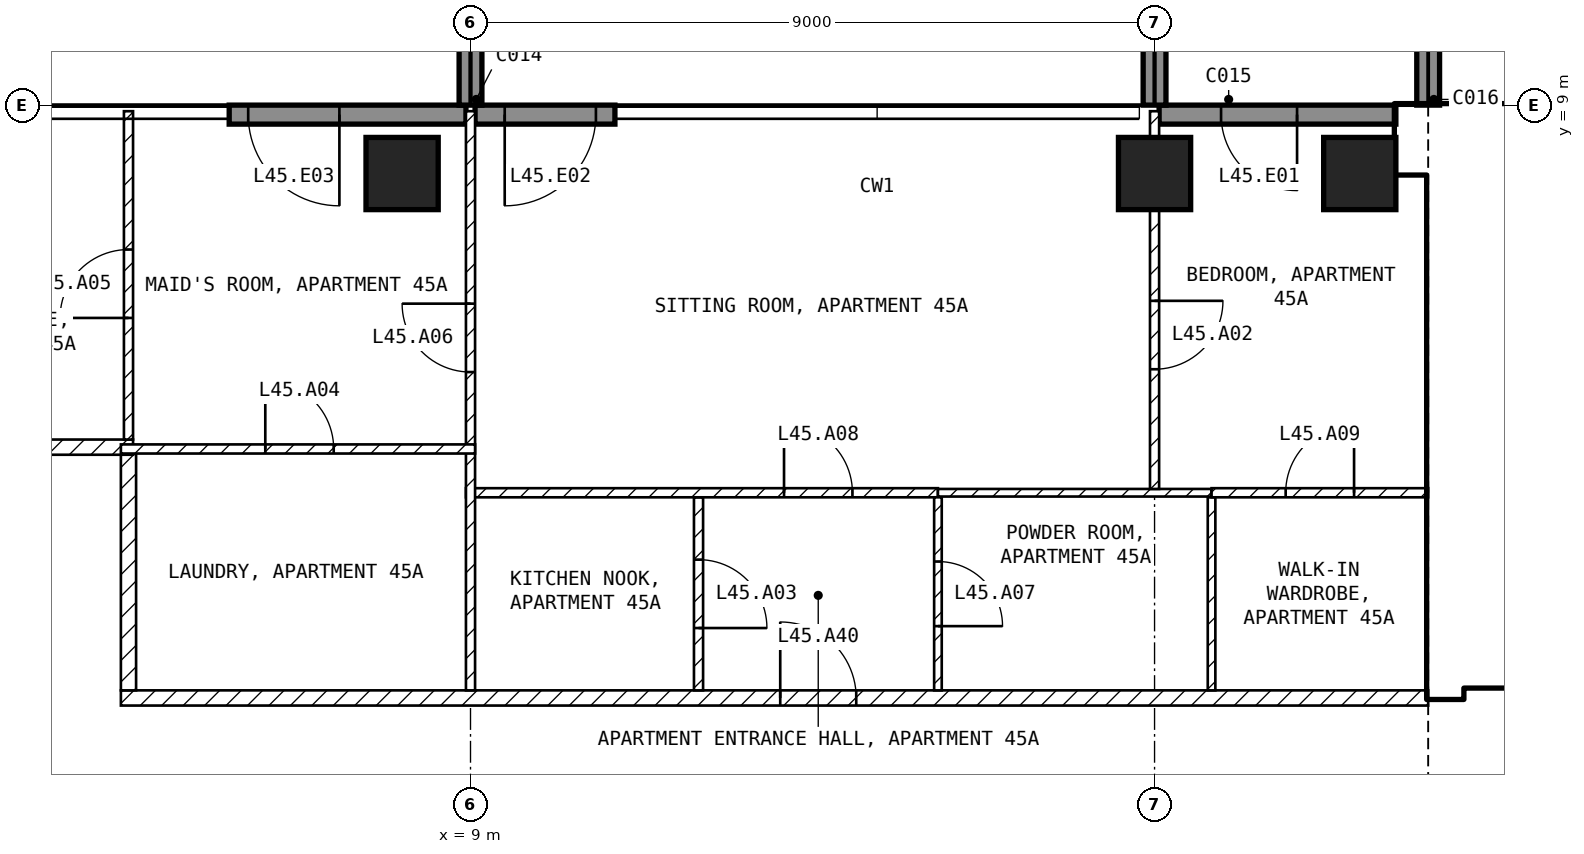
"""IFC4 building model, lengths in metres.
Left out: names, types, materials, properties, quantities, classifications, styles, units other than length and angle.
Written with IfcOpenShell. Run it as: python <this file> out.ifc"""

import sys

from ifc_helpers import new_model, si_unit, direction, frame, frame_2d, origin, origin_2d, place, context, subcontext, project, spatial, rectangle, extrude, element, fill, save


model = new_model("IFC4")
c1 = context("Model", 3, precision=1e-05, world=origin(), true_north=direction((0.0, 1.0)))
c2 = subcontext(c1, "Body", "Model", "MODEL_VIEW")
j1 = project(units=[si_unit("LENGTHUNIT", "METRE"), si_unit("PLANEANGLEUNIT", "RADIAN")], contexts=[c1])
p1 = place(None, origin())
s1 = spatial("IfcSite", under=j1, at=p1, CompositionType="ELEMENT")
p2 = place(p1, origin())
s2 = spatial("IfcBuilding", under=s1, at=p2, CompositionType="ELEMENT")
p3 = place(p2, frame((0.0, 0.0, 184.1)))
s3 = spatial("IfcBuildingStorey", under=s2, at=p3, CompositionType="ELEMENT", Elevation=184.1)
for number, where, z_axis, x_axis in (
    (1, (8.1, 8.1, -0.25), (0.0, 0.0, 1.0), (1.0, 0.0, 0.0)),
    (2, (18.0, 8.1, -0.25), (0.0, 0.0, 1.0), (1.0, 0.0, 0.0)),
    (3, (20.7, 8.1, -0.25), (0.0, 0.0, 1.0), (1.0, 0.0, 0.0)),
):
    element("IfcColumn", number, at=place(p3, frame(where, z_axis=z_axis, x_axis=x_axis)), inside=s3, PredefinedType="COLUMN", context=c2, shape_type="SweptSolid", body=[
        extrude(rectangle(XDim=0.95, YDim=0.95, at=origin_2d()), origin(), (0.0, 0.0, 1.0), 3.5),
    ])
p4 = place(p3, frame((21.175, 8.875, 0.0), z_axis=(0.0, 0.0, 1.0), x_axis=(-1.0, 0.0, 0.0)))
e4 = element("IfcWall", 4, at=p4, inside=s3, PredefinedType="SOLIDWALL", context=c2, shape_type="SweptSolid", body=[
    extrude(rectangle(XDim=3.115, YDim=0.25, at=frame_2d((1.558, 0.0))), origin(), (0.0, 0.0, 1.0), 3.25),
])
p5 = place(p4, frame((1.3, 0.0, 0.0)))
e5 = element("IfcOpeningElement", 5, at=p5, cuts=e4, PredefinedType="OPENING", context=c2, shape_type="SweptSolid", body=[
    extrude(rectangle(XDim=1.0, YDim=2.4, at=frame_2d((0.5, 1.2))), frame((0.0, 0.135, 0.0), z_axis=(0.0, -1.0, 0.0), x_axis=(1.0, 0.0, 0.0)), (0.0, 0.0, 1.0), 0.27),
])
p6 = place(p3, frame((10.9, 8.875, 0.0), z_axis=(0.0, 0.0, 1.0), x_axis=(-1.0, 0.0, 0.0)))
e6 = element("IfcWall", 6, at=p6, inside=s3, PredefinedType="SOLIDWALL", context=c2, shape_type="SweptSolid", body=[
    extrude(rectangle(XDim=1.84, YDim=0.25, at=frame_2d((0.92, 0.0))), origin(), (0.0, 0.0, 1.0), 3.25),
])
p7 = place(p6, frame((0.25, 0.0, 0.0)))
e7 = element("IfcOpeningElement", 7, at=p7, cuts=e6, PredefinedType="OPENING", context=c2, shape_type="SweptSolid", body=[
    extrude(rectangle(XDim=1.2, YDim=2.4, at=frame_2d((0.6, 1.2))), frame((0.0, 0.135, 0.0), z_axis=(0.0, -1.0, 0.0), x_axis=(1.0, 0.0, 0.0)), (0.0, 0.0, 1.0), 0.27),
])
p8 = place(p3, frame((8.94, 8.875, 0.0), z_axis=(0.0, 0.0, 1.0), x_axis=(-1.0, 0.0, 0.0)))
e8 = element("IfcWall", 8, at=p8, inside=s3, PredefinedType="SOLIDWALL", context=c2, shape_type="SweptSolid", body=[
    extrude(rectangle(XDim=3.115, YDim=0.25, at=frame_2d((1.558, 0.0))), origin(), (0.0, 0.0, 1.0), 3.25),
])
p9 = place(p8, frame((1.665, 0.0, 0.0)))
e9 = element("IfcOpeningElement", 9, at=p9, cuts=e8, PredefinedType="OPENING", context=c2, shape_type="SweptSolid", body=[
    extrude(rectangle(XDim=1.2, YDim=2.4, at=frame_2d((0.6, 1.2))), frame((0.0, 0.135, 0.0), z_axis=(0.0, -1.0, 0.0), x_axis=(1.0, 0.0, 0.0)), (0.0, 0.0, 1.0), 0.27),
])
for number, where, z_axis, x_axis in (
    (10, (9.0, 9.0, 0.0), (0.0, 0.0, 1.0), (0.0, 1.0, 0.0)),
    (11, (18.0, 9.0, 0.0), (0.0, 0.0, 1.0), (0.0, 1.0, 0.0)),
    (12, (21.6, 9.0, 0.0), (0.0, 0.0, 1.0), (0.0, 1.0, 0.0)),
):
    element("IfcWall", number, at=place(p3, frame(where, z_axis=z_axis, x_axis=x_axis)), inside=s3, PredefinedType="SOLIDWALL", context=c2, shape_type="SweptSolid", body=[
        extrude(rectangle(XDim=2.7, YDim=0.3, at=frame_2d((1.35, 0.0))), origin(), (0.0, 0.0, 1.0), 3.25),
    ])
p10 = place(p3, frame((21.175, 8.55, 0.0), z_axis=(0.0, 0.0, 1.0), x_axis=(1.0, 0.0, 0.0)))
e13 = element("IfcWall", 13, at=p10, inside=s3, PredefinedType="SHEAR", context=c2, shape_type="SweptSolid", body=[
    extrude(rectangle(XDim=8.425, YDim=0.9, at=frame_2d((4.212, 0.0))), origin(), (0.0, 0.0, 1.0), 3.25),
])
p11 = place(p3, frame((21.825, 1.2, 0.0), z_axis=(0.0, 0.0, 1.0), x_axis=(0.0, 1.0, 0.0)))
e14 = element("IfcWall", 14, at=p11, inside=s3, PredefinedType="SHEAR", context=c2, shape_type="SweptSolid", body=[
    extrude(rectangle(XDim=6.9, YDim=0.45, at=frame_2d((3.45, 0.0))), origin(), (0.0, 0.0, 1.0), 3.25),
])
p12 = place(p3, frame((22.05, 1.45, 0.0), z_axis=(0.0, 0.0, 1.0), x_axis=(1.0, 0.0, 0.0)))
e15 = element("IfcWall", 15, at=p12, inside=s3, PredefinedType="SOLIDWALL", context=c2, shape_type="SweptSolid", body=[
    extrude(rectangle(XDim=11.15, YDim=0.2, at=frame_2d((5.575, 0.0))), origin(), (0.0, 0.0, 1.0), 3.25),
])
p13 = place(p12, frame((0.75, 0.0, 0.0)))
e16 = element("IfcOpeningElement", 16, at=p13, cuts=e15, PredefinedType="OPENING", context=c2, shape_type="SweptSolid", body=[
    extrude(rectangle(XDim=1.0, YDim=2.1, at=frame_2d((0.5, 1.05))), frame((0.0, 0.11, 0.0), z_axis=(0.0, -1.0, 0.0), x_axis=(1.0, 0.0, 0.0)), (0.0, 0.0, 1.0), 0.22),
])
p14 = place(p12, frame((3.25, 0.0, 0.0)))
e17 = element("IfcOpeningElement", 17, at=p14, cuts=e15, PredefinedType="OPENING", context=c2, shape_type="SweptSolid", body=[
    extrude(rectangle(XDim=1.0, YDim=2.1, at=frame_2d((0.5, 1.05))), frame((0.0, 0.11, 0.0), z_axis=(0.0, -1.0, 0.0), x_axis=(1.0, 0.0, 0.0)), (0.0, 0.0, 1.0), 0.22),
])
p15 = place(p12, frame((9.15, 0.0, 0.0)))
e18 = element("IfcOpeningElement", 18, at=p15, cuts=e15, PredefinedType="OPENING", context=c2, shape_type="SweptSolid", body=[
    extrude(rectangle(XDim=0.9, YDim=2.1, at=frame_2d((0.45, 1.05))), frame((0.0, 0.11, 0.0), z_axis=(0.0, -1.0, 0.0), x_axis=(1.0, 0.0, 0.0)), (0.0, 0.0, 1.0), 0.22),
])
p16 = place(p3, frame((22.05, 5.15, 0.0), z_axis=(0.0, 0.0, 1.0), x_axis=(1.0, 0.0, 0.0)))
e19 = element("IfcWall", 19, at=p16, inside=s3, PredefinedType="SOLIDWALL", context=c2, shape_type="SweptSolid", body=[
    extrude(rectangle(XDim=6.3, YDim=0.2, at=frame_2d((3.15, 0.0))), origin(), (0.0, 0.0, 1.0), 3.25),
])
p17 = place(p16, frame((0.2, 0.0, 0.0)))
e20 = element("IfcOpeningElement", 20, at=p17, cuts=e19, PredefinedType="OPENING", context=c2, shape_type="SweptSolid", body=[
    extrude(rectangle(XDim=1.0, YDim=2.1, at=frame_2d((0.5, 1.05))), frame((0.0, 0.11, 0.0), z_axis=(0.0, -1.0, 0.0), x_axis=(1.0, 0.0, 0.0)), (0.0, 0.0, 1.0), 0.22),
])
p18 = place(p3, frame((4.4, 1.2, 0.0), z_axis=(0.0, 0.0, 1.0), x_axis=(1.0, 0.0, 0.0)))
e21 = element("IfcWall", 21, at=p18, inside=s3, PredefinedType="PARTITIONING", context=c2, shape_type="SweptSolid", body=[
    extrude(rectangle(XDim=17.2, YDim=0.2, at=frame_2d((8.6, 0.0))), origin(), (0.0, 0.0, 1.0), 3.25),
])
p19 = place(p18, frame((8.675, 0.0, 0.0)))
e22 = element("IfcOpeningElement", 22, at=p19, cuts=e21, PredefinedType="OPENING", context=c2, shape_type="SweptSolid", body=[
    extrude(rectangle(XDim=1.0, YDim=2.1, at=frame_2d((0.5, 1.05))), frame((0.0, 0.11, 0.0), z_axis=(0.0, -1.0, 0.0), x_axis=(1.0, 0.0, 0.0)), (0.0, 0.0, 1.0), 0.22),
])
p20 = place(p3, frame((4.5, 4.416, 0.0), z_axis=(0.0, 0.0, 1.0), x_axis=(0.0, -1.0, 0.0)))
e23 = element("IfcWall", 23, at=p20, inside=s3, PredefinedType="PARTITIONING", context=c2, shape_type="SweptSolid", body=[
    extrude(rectangle(XDim=3.116, YDim=0.2, at=frame_2d((1.558, 0.0))), origin(), (0.0, 0.0, 1.0), 3.25),
])
p21 = place(p3, frame((1.1, 4.5, 0.0), z_axis=(0.0, 0.0, 1.0), x_axis=(1.0, 0.0, 0.0)))
e24 = element("IfcWall", 24, at=p21, inside=s3, PredefinedType="PARTITIONING", context=c2, shape_type="SweptSolid", body=[
    extrude(rectangle(XDim=3.46, YDim=0.2, at=frame_2d((1.73, 0.0))), origin(), (0.0, 0.0, 1.0), 3.25),
])
p22 = place(p3, frame((12.0, 3.84, 0.0), z_axis=(0.0, 0.0, 1.0), x_axis=(0.0, -1.0, 0.0)))
e25 = element("IfcWall", 25, at=p22, inside=s3, PredefinedType="PARTITIONING", context=c2, shape_type="SweptSolid", body=[
    extrude(rectangle(XDim=2.54, YDim=0.12, at=frame_2d((1.27, 0.0))), origin(), (0.0, 0.0, 1.0), 3.25),
])
p23 = place(p22, frame((0.82, 0.0, 0.0)))
e26 = element("IfcOpeningElement", 26, at=p23, cuts=e25, PredefinedType="OPENING", context=c2, shape_type="SweptSolid", body=[
    extrude(rectangle(XDim=0.9, YDim=2.1, at=frame_2d((0.45, 1.05))), frame((0.0, 0.07, 0.0), z_axis=(0.0, -1.0, 0.0), x_axis=(1.0, 0.0, 0.0)), (0.0, 0.0, 1.0), 0.14),
])
p24 = place(p3, frame((8.94, 3.9, 0.0), z_axis=(0.0, 0.0, 1.0), x_axis=(1.0, 0.0, 0.0)))
e27 = element("IfcWall", 27, at=p24, inside=s3, PredefinedType="PARTITIONING", context=c2, shape_type="SweptSolid", body=[
    extrude(rectangle(XDim=6.21, YDim=0.12, at=frame_2d((3.105, 0.0))), origin(), (0.0, 0.0, 1.0), 3.25),
])
p25 = place(p24, frame((4.185, 0.0, 0.0)))
e28 = element("IfcOpeningElement", 28, at=p25, cuts=e27, PredefinedType="OPENING", context=c2, shape_type="SweptSolid", body=[
    extrude(rectangle(XDim=0.9, YDim=2.1, at=frame_2d((0.45, 1.05))), frame((0.0, 0.07, 0.0), z_axis=(0.0, -1.0, 0.0), x_axis=(1.0, 0.0, 0.0)), (0.0, 0.0, 1.0), 0.14),
])
p26 = place(p3, frame((9.0, 1.3, 0.0), z_axis=(0.0, 0.0, 1.0), x_axis=(0.0, 1.0, 0.0)))
e29 = element("IfcWall", 29, at=p26, inside=s3, PredefinedType="PARTITIONING", context=c2, shape_type="SweptSolid", body=[
    extrude(rectangle(XDim=7.62, YDim=0.12, at=frame_2d((3.81, 0.0))), origin(), (0.0, 0.0, 1.0), 3.25),
])
p27 = place(p26, frame((4.188, 0.0, 0.0)))
e30 = element("IfcOpeningElement", 30, at=p27, cuts=e29, PredefinedType="OPENING", context=c2, shape_type="SweptSolid", body=[
    extrude(rectangle(XDim=0.9, YDim=2.1, at=frame_2d((0.45, 1.05))), frame((0.0, 0.07, 0.0), z_axis=(0.0, -1.0, 0.0), x_axis=(1.0, 0.0, 0.0)), (0.0, 0.0, 1.0), 0.14),
])
p28 = place(p3, frame((15.15, 3.84, 0.0), z_axis=(0.0, 0.0, 1.0), x_axis=(0.0, -1.0, 0.0)))
e31 = element("IfcWall", 31, at=p28, inside=s3, PredefinedType="PARTITIONING", context=c2, shape_type="SweptSolid", body=[
    extrude(rectangle(XDim=2.54, YDim=0.1, at=frame_2d((1.27, 0.0))), origin(), (0.0, 0.0, 1.0), 3.25),
])
p29 = place(p28, frame((0.845, 0.0, 0.0)))
e32 = element("IfcOpeningElement", 32, at=p29, cuts=e31, PredefinedType="OPENING", context=c2, shape_type="SweptSolid", body=[
    extrude(rectangle(XDim=0.85, YDim=2.1, at=frame_2d((0.425, 1.05))), frame((0.0, 0.06, 0.0), z_axis=(0.0, -1.0, 0.0), x_axis=(1.0, 0.0, 0.0)), (0.0, 0.0, 1.0), 0.12),
])
p30 = place(p3, frame((18.75, 3.84, 0.0), z_axis=(0.0, 0.0, 1.0), x_axis=(0.0, -1.0, 0.0)))
e33 = element("IfcWall", 33, at=p30, inside=s3, PredefinedType="PARTITIONING", context=c2, shape_type="SweptSolid", body=[
    extrude(rectangle(XDim=2.54, YDim=0.1, at=frame_2d((1.27, 0.0))), origin(), (0.0, 0.0, 1.0), 3.25),
])
p31 = place(p3, frame((15.15, 3.9, 0.0), z_axis=(0.0, 0.0, 1.0), x_axis=(1.0, 0.0, 0.0)))
e34 = element("IfcWall", 34, at=p31, inside=s3, PredefinedType="PARTITIONING", context=c2, shape_type="SweptSolid", body=[
    extrude(rectangle(XDim=3.6, YDim=0.1, at=frame_2d((1.8, 0.0))), origin(), (0.0, 0.0, 1.0), 3.25),
])
p32 = place(p3, frame((18.75, 3.9, 0.0), z_axis=(0.0, 0.0, 1.0), x_axis=(1.0, 0.0, 0.0)))
e35 = element("IfcWall", 35, at=p32, inside=s3, PredefinedType="PARTITIONING", context=c2, shape_type="SweptSolid", body=[
    extrude(rectangle(XDim=2.85, YDim=0.12, at=frame_2d((1.425, 0.0))), origin(), (0.0, 0.0, 1.0), 3.25),
])
p33 = place(p32, frame((0.975, 0.0, 0.0)))
e36 = element("IfcOpeningElement", 36, at=p33, cuts=e35, PredefinedType="OPENING", context=c2, shape_type="SweptSolid", body=[
    extrude(rectangle(XDim=0.9, YDim=2.1, at=frame_2d((0.45, 1.05))), frame((0.0, 0.07, 0.0), z_axis=(0.0, -1.0, 0.0), x_axis=(1.0, 0.0, 0.0)), (0.0, 0.0, 1.0), 0.14),
])
p34 = place(p3, frame((18.0, 8.92, 0.0), z_axis=(0.0, 0.0, 1.0), x_axis=(0.0, -1.0, 0.0)))
e37 = element("IfcWall", 37, at=p34, inside=s3, PredefinedType="PARTITIONING", context=c2, shape_type="SweptSolid", body=[
    extrude(rectangle(XDim=4.97, YDim=0.12, at=frame_2d((2.485, 0.0))), origin(), (0.0, 0.0, 1.0), 2.48),
])
p35 = place(p34, frame((2.495, 0.0, 0.0)))
e38 = element("IfcOpeningElement", 38, at=p35, cuts=e37, PredefinedType="OPENING", context=c2, shape_type="SweptSolid", body=[
    extrude(rectangle(XDim=0.9, YDim=2.1, at=frame_2d((0.45, 1.05))), frame((0.0, 0.07, 0.0), z_axis=(0.0, -1.0, 0.0), x_axis=(1.0, 0.0, 0.0)), (0.0, 0.0, 1.0), 0.14),
])
p36 = place(p3, frame((4.4, 4.476, 0.0), z_axis=(0.0, 0.0, 1.0), x_axis=(1.0, 0.0, 0.0)))
e39 = element("IfcWall", 39, at=p36, inside=s3, PredefinedType="PARTITIONING", context=c2, shape_type="SweptSolid", body=[
    extrude(rectangle(XDim=4.66, YDim=0.12, at=frame_2d((2.33, 0.0))), origin(), (0.0, 0.0, 1.0), 3.25),
])
p37 = place(p36, frame((1.9, 0.0, 0.0)))
e40 = element("IfcOpeningElement", 40, at=p37, cuts=e39, PredefinedType="OPENING", context=c2, shape_type="SweptSolid", body=[
    extrude(rectangle(XDim=0.9, YDim=2.1, at=frame_2d((0.45, 1.05))), frame((0.0, 0.07, 0.0), z_axis=(0.0, -1.0, 0.0), x_axis=(1.0, 0.0, 0.0)), (0.0, 0.0, 1.0), 0.14),
])
p38 = place(p3, frame((4.5, 4.6, 0.0), z_axis=(0.0, 0.0, 1.0), x_axis=(0.0, 1.0, 0.0)))
e41 = element("IfcWall", 41, at=p38, inside=s3, PredefinedType="PARTITIONING", context=c2, shape_type="SweptSolid", body=[
    extrude(rectangle(XDim=4.32, YDim=0.12, at=frame_2d((2.16, 0.0))), origin(), (0.0, 0.0, 1.0), 3.25),
])
p39 = place(p38, frame((1.6, 0.0, 0.0)))
e42 = element("IfcOpeningElement", 42, at=p39, cuts=e41, PredefinedType="OPENING", context=c2, shape_type="SweptSolid", body=[
    extrude(rectangle(XDim=0.9, YDim=2.1, at=frame_2d((0.45, 1.05))), frame((0.0, 0.07, 0.0), z_axis=(0.0, -1.0, 0.0), x_axis=(1.0, 0.0, 0.0)), (0.0, 0.0, 1.0), 0.14),
])
p40 = place(p5, origin())
e43 = element("IfcDoor", 43, at=p40, inside=s3, OperationType="SINGLE_SWING_LEFT", PredefinedType="DOOR", context=c2, shape_type="SweptSolid", body=[
    extrude(rectangle(XDim=1.0, YDim=2.4, at=frame_2d((0.5, 1.2))), frame((0.0, 0.025, 0.0), z_axis=(0.0, -1.0, 0.0), x_axis=(1.0, 0.0, 0.0)), (0.0, 0.0, 1.0), 0.05),
])
fill(e5, e43)
p41 = place(p7, origin())
e44 = element("IfcDoor", 44, at=p41, inside=s3, OperationType="SINGLE_SWING_RIGHT", PredefinedType="DOOR", context=c2, shape_type="SweptSolid", body=[
    extrude(rectangle(XDim=1.2, YDim=2.4, at=frame_2d((0.6, 1.2))), frame((0.0, 0.025, 0.0), z_axis=(0.0, -1.0, 0.0), x_axis=(1.0, 0.0, 0.0)), (0.0, 0.0, 1.0), 0.05),
])
fill(e7, e44)
p42 = place(p9, origin())
e45 = element("IfcDoor", 45, at=p42, inside=s3, OperationType="SINGLE_SWING_LEFT", PredefinedType="DOOR", context=c2, shape_type="SweptSolid", body=[
    extrude(rectangle(XDim=1.2, YDim=2.4, at=frame_2d((0.6, 1.2))), frame((0.0, 0.025, 0.0), z_axis=(0.0, -1.0, 0.0), x_axis=(1.0, 0.0, 0.0)), (0.0, 0.0, 1.0), 0.05),
])
fill(e9, e45)
p43 = place(p17, origin())
e46 = element("IfcDoor", 46, at=p43, inside=s3, OperationType="SINGLE_SWING_LEFT", PredefinedType="DOOR", context=c2, shape_type="SweptSolid", body=[
    extrude(rectangle(XDim=1.0, YDim=2.1, at=frame_2d((0.5, 1.05))), frame((0.0, 0.025, 0.0), z_axis=(0.0, -1.0, 0.0), x_axis=(1.0, 0.0, 0.0)), (0.0, 0.0, 1.0), 0.05),
])
fill(e20, e46)
p44 = place(p35, origin())
e47 = element("IfcDoor", 47, at=p44, inside=s3, OperationType="SINGLE_SWING_LEFT", PredefinedType="DOOR", context=c2, shape_type="SweptSolid", body=[
    extrude(rectangle(XDim=0.9, YDim=2.1, at=frame_2d((0.45, 1.05))), frame((0.0, 0.025, 0.0), z_axis=(0.0, -1.0, 0.0), x_axis=(1.0, 0.0, 0.0)), (0.0, 0.0, 1.0), 0.05),
])
fill(e38, e47)
p45 = place(p23, origin())
e48 = element("IfcDoor", 48, at=p45, inside=s3, OperationType="SINGLE_SWING_RIGHT", PredefinedType="DOOR", context=c2, shape_type="SweptSolid", body=[
    extrude(rectangle(XDim=0.9, YDim=2.1, at=frame_2d((0.45, 1.05))), frame((0.0, 0.025, 0.0), z_axis=(0.0, -1.0, 0.0), x_axis=(1.0, 0.0, 0.0)), (0.0, 0.0, 1.0), 0.05),
])
fill(e26, e48)
p46 = place(p37, origin())
e49 = element("IfcDoor", 49, at=p46, inside=s3, OperationType="SINGLE_SWING_LEFT", PredefinedType="DOOR", context=c2, shape_type="SweptSolid", body=[
    extrude(rectangle(XDim=0.9, YDim=2.1, at=frame_2d((0.45, 1.05))), frame((0.0, 0.025, 0.0), z_axis=(0.0, -1.0, 0.0), x_axis=(1.0, 0.0, 0.0)), (0.0, 0.0, 1.0), 0.05),
])
fill(e40, e49)
p47 = place(p39, origin())
e50 = element("IfcDoor", 50, at=p47, inside=s3, OperationType="SINGLE_SWING_LEFT", PredefinedType="DOOR", context=c2, shape_type="SweptSolid", body=[
    extrude(rectangle(XDim=0.9, YDim=2.1, at=frame_2d((0.45, 1.05))), frame((0.0, 0.025, 0.0), z_axis=(0.0, -1.0, 0.0), x_axis=(1.0, 0.0, 0.0)), (0.0, 0.0, 1.0), 0.05),
])
fill(e42, e50)
p48 = place(p27, origin())
e51 = element("IfcDoor", 51, at=p48, inside=s3, OperationType="SINGLE_SWING_RIGHT", PredefinedType="DOOR", context=c2, shape_type="SweptSolid", body=[
    extrude(rectangle(XDim=0.9, YDim=2.1, at=frame_2d((0.45, 1.05))), frame((0.0, 0.025, 0.0), z_axis=(0.0, -1.0, 0.0), x_axis=(1.0, 0.0, 0.0)), (0.0, 0.0, 1.0), 0.05),
])
fill(e30, e51)
p49 = place(p29, origin())
e52 = element("IfcDoor", 52, at=p49, inside=s3, OperationType="SINGLE_SWING_RIGHT", PredefinedType="DOOR", context=c2, shape_type="SweptSolid", body=[
    extrude(rectangle(XDim=0.85, YDim=2.1, at=frame_2d((0.425, 1.05))), frame((0.0, 0.025, 0.0), z_axis=(0.0, -1.0, 0.0), x_axis=(1.0, 0.0, 0.0)), (0.0, 0.0, 1.0), 0.05),
])
fill(e32, e52)
p50 = place(p25, origin())
e53 = element("IfcDoor", 53, at=p50, inside=s3, OperationType="SINGLE_SWING_LEFT", PredefinedType="DOOR", context=c2, shape_type="SweptSolid", body=[
    extrude(rectangle(XDim=0.9, YDim=2.1, at=frame_2d((0.45, 1.05))), frame((0.0, 0.025, 0.0), z_axis=(0.0, -1.0, 0.0), x_axis=(1.0, 0.0, 0.0)), (0.0, 0.0, 1.0), 0.05),
])
fill(e28, e53)
p51 = place(p33, origin())
e54 = element("IfcDoor", 54, at=p51, inside=s3, OperationType="SINGLE_SWING_RIGHT", PredefinedType="DOOR", context=c2, shape_type="SweptSolid", body=[
    extrude(rectangle(XDim=0.9, YDim=2.1, at=frame_2d((0.45, 1.05))), frame((0.0, 0.025, 0.0), z_axis=(0.0, -1.0, 0.0), x_axis=(1.0, 0.0, 0.0)), (0.0, 0.0, 1.0), 0.05),
])
fill(e36, e54)
p52 = place(p19, origin())
e55 = element("IfcDoor", 55, at=p52, inside=s3, OperationType="SINGLE_SWING_LEFT", PredefinedType="DOOR", context=c2, shape_type="SweptSolid", body=[
    extrude(rectangle(XDim=1.0, YDim=2.1, at=frame_2d((0.5, 1.05))), frame((0.0, 0.025, 0.0), z_axis=(0.0, -1.0, 0.0), x_axis=(1.0, 0.0, 0.0)), (0.0, 0.0, 1.0), 0.05),
])
fill(e22, e55)
save(model, sys.argv[1])
